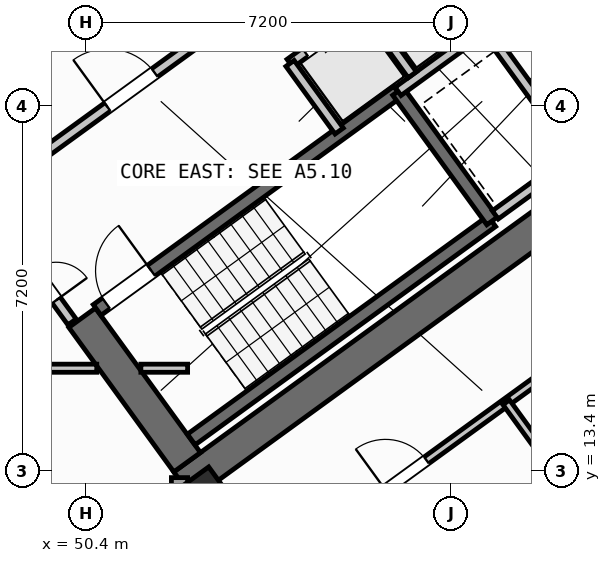
"""IFC4 building model, lengths in metres.
Left out: names, types, materials, properties, quantities, classifications, styles, units other than length and angle.
Written with IfcOpenShell. Run it as: python <this file> out.ifc"""

import sys

from ifc_helpers import new_model, si_unit, direction, frame, frame_2d, origin, origin_2d, place, context, subcontext, project, spatial, rectangle, hollow_rectangle, extrude, source, transform, mapped, element, fill, save


model = new_model("IFC4")
c1 = context("Model", 3, precision=1e-05, world=origin(), true_north=direction((0.0, 1.0)))
c2 = subcontext(c1, "Body", "Model", "MODEL_VIEW")
j1 = project(units=[si_unit("LENGTHUNIT", "METRE"), si_unit("PLANEANGLEUNIT", "RADIAN")], contexts=[c1])
p1 = place(None, origin())
s1 = spatial("IfcSite", under=j1, at=p1, CompositionType="ELEMENT")
p2 = place(p1, origin())
s2 = spatial("IfcBuilding", under=s1, at=p2, CompositionType="ELEMENT")
p3 = place(p2, frame((0.0, 0.0, 56.4)))
s3 = spatial("IfcBuildingStorey", under=s2, at=p3, CompositionType="ELEMENT", Elevation=56.4)
p4 = place(p3, frame((52.318, 13.11, 0.0), z_axis=(0.0, 0.0, 1.0), x_axis=(0.809019445368, 0.587781878776, 0.0)))
e1 = element("IfcWall", 1, at=p4, inside=s3, PredefinedType="SHEAR", context=c2, shape_type="SweptSolid", body=[
    extrude(rectangle(XDim=12.44, YDim=0.65, at=frame_2d((6.22, 0.0))), origin(), (0.0, 0.0, 1.0), 3.35),
])
p5 = place(p3, frame((52.39, 13.564, 0.0), z_axis=(0.0, 0.0, 1.0), x_axis=(-0.58779688989, 0.809008539037, 0.0)))
e2 = element("IfcWall", 2, at=p5, inside=s3, PredefinedType="SHEAR", context=c2, shape_type="SweptSolid", body=[
    extrude(rectangle(XDim=3.525, YDim=0.65, at=frame_2d((1.763, 0.0))), origin(), (0.0, 0.0, 1.0), 3.35),
])
m1 = source(origin(), c2, "Body", "SweptSolid", [
    extrude(hollow_rectangle(XDim=1.0, YDim=1.0, WallThickness=0.04, at=origin_2d()), origin(), (0.0, 0.0, 1.0), 3.6),
])
p6 = place(p3, frame((52.705, 12.773, 0.0), z_axis=(0.0, 0.0, 1.0), x_axis=(0.809016994375, 0.587785252292, 0.0)))
e3 = element("IfcColumn", 3, at=p6, inside=s3, PredefinedType="COLUMN", context=c2, shape_type="MappedRepresentation", body=[
    mapped(m1, transform((0.0, 0.0, 0.0), scale=1.0)),
])
p7 = place(p3, frame((58.455, 35.484, 0.0), z_axis=(0.0, 0.0, 1.0), x_axis=(0.587783625747, -0.809018176127, 0.0)))
e4 = element("IfcWall", 4, at=p7, inside=s3, PredefinedType="STANDARD", context=c2, shape_type="SweptSolid", body=[
    extrude(rectangle(XDim=21.587, YDim=0.32, at=frame_2d((10.794, 0.0))), origin(), (0.0, 0.0, 1.0), 2.725),
])
p8 = place(p7, frame((1.54, 0.0, 0.85)))
e5 = element("IfcOpeningElement", 5, at=p8, cuts=e4, PredefinedType="OPENING", context=c2, shape_type="SweptSolid", body=[
    extrude(rectangle(XDim=1.5, YDim=1.5, at=frame_2d((0.75, 0.75))), frame((0.0, 0.17, 0.0), z_axis=(0.0, -1.0, 0.0), x_axis=(1.0, 0.0, 0.0)), (0.0, 0.0, 1.0), 0.34),
])
p9 = place(p7, frame((4.695, 0.0, 0.85)))
e6 = element("IfcOpeningElement", 6, at=p9, cuts=e4, PredefinedType="OPENING", context=c2, shape_type="SweptSolid", body=[
    extrude(rectangle(XDim=1.8, YDim=1.5, at=frame_2d((0.9, 0.75))), frame((0.0, 0.17, 0.0), z_axis=(0.0, -1.0, 0.0), x_axis=(1.0, 0.0, 0.0)), (0.0, 0.0, 1.0), 0.34),
])
p10 = place(p7, frame((13.009, 0.0, 1.0)))
e7 = element("IfcOpeningElement", 7, at=p10, cuts=e4, PredefinedType="OPENING", context=c2, shape_type="SweptSolid", body=[
    extrude(rectangle(XDim=0.9, YDim=1.25, at=frame_2d((0.45, 0.625))), frame((0.0, 0.17, 0.0), z_axis=(0.0, -1.0, 0.0), x_axis=(1.0, 0.0, 0.0)), (0.0, 0.0, 1.0), 0.34),
])
p11 = place(p7, frame((16.092, 0.0, 0.95)))
e8 = element("IfcOpeningElement", 8, at=p11, cuts=e4, PredefinedType="OPENING", context=c2, shape_type="SweptSolid", body=[
    extrude(rectangle(XDim=1.2, YDim=1.4, at=frame_2d((0.6, 0.7))), frame((0.0, 0.17, 0.0), z_axis=(0.0, -1.0, 0.0), x_axis=(1.0, 0.0, 0.0)), (0.0, 0.0, 1.0), 0.34),
])
p12 = place(p7, frame((19.085, 0.0, 1.0)))
e9 = element("IfcOpeningElement", 9, at=p12, cuts=e4, PredefinedType="OPENING", context=c2, shape_type="SweptSolid", body=[
    extrude(rectangle(XDim=0.9, YDim=1.25, at=frame_2d((0.45, 0.625))), frame((0.0, 0.17, 0.0), z_axis=(0.0, -1.0, 0.0), x_axis=(1.0, 0.0, 0.0)), (0.0, 0.0, 1.0), 0.34),
])
p13 = place(p3, frame((71.098, 17.731, 0.0), z_axis=(0.0, 0.0, 1.0), x_axis=(-0.809021120468, -0.587779573171, 0.0)))
e10 = element("IfcWall", 10, at=p13, inside=s3, PredefinedType="STANDARD", context=c2, shape_type="SweptSolid", body=[
    extrude(rectangle(XDim=17.588, YDim=0.32, at=frame_2d((8.794, 0.0))), origin(), (0.0, 0.0, 1.0), 3.35),
])
p14 = place(p13, frame((1.624, 0.0, 0.0)))
e11 = element("IfcOpeningElement", 11, at=p14, cuts=e10, PredefinedType="OPENING", context=c2, shape_type="SweptSolid", body=[
    extrude(rectangle(XDim=1.05, YDim=2.15, at=frame_2d((0.525, 1.075))), frame((0.0, 0.17, 0.0), z_axis=(0.0, -1.0, 0.0), x_axis=(1.0, 0.0, 0.0)), (0.0, 0.0, 1.0), 0.34),
])
p15 = place(p13, frame((4.104, 0.0, 1.0)))
e12 = element("IfcOpeningElement", 12, at=p15, cuts=e10, PredefinedType="OPENING", context=c2, shape_type="SweptSolid", body=[
    extrude(rectangle(XDim=0.9, YDim=1.25, at=frame_2d((0.45, 0.625))), frame((0.0, 0.17, 0.0), z_axis=(0.0, -1.0, 0.0), x_axis=(1.0, 0.0, 0.0)), (0.0, 0.0, 1.0), 0.34),
])
p16 = place(p13, frame((7.879, 0.0, 0.85)))
e13 = element("IfcOpeningElement", 13, at=p16, cuts=e10, PredefinedType="OPENING", context=c2, shape_type="SweptSolid", body=[
    extrude(rectangle(XDim=1.8, YDim=1.5, at=frame_2d((0.9, 0.75))), frame((0.0, 0.17, 0.0), z_axis=(0.0, -1.0, 0.0), x_axis=(1.0, 0.0, 0.0)), (0.0, 0.0, 1.0), 0.34),
])
p17 = place(p13, frame((13.529, 0.0, 0.85)))
e14 = element("IfcOpeningElement", 14, at=p17, cuts=e10, PredefinedType="OPENING", context=c2, shape_type="SweptSolid", body=[
    extrude(rectangle(XDim=1.5, YDim=1.5, at=frame_2d((0.75, 0.75))), frame((0.0, 0.17, 0.0), z_axis=(0.0, -1.0, 0.0), x_axis=(1.0, 0.0, 0.0)), (0.0, 0.0, 1.0), 0.34),
])
p18 = place(p3, frame((52.24, 13.261, 0.0), z_axis=(0.0, 0.0, 1.0), x_axis=(0.0, -1.0, 0.0)))
e15 = element("IfcWall", 15, at=p18, inside=s3, PredefinedType="STANDARD", context=c2, shape_type="SweptSolid", body=[
    extrude(rectangle(XDim=9.795, YDim=0.32, at=frame_2d((4.897, 0.0))), origin(), (0.0, 0.0, 1.0), 3.35),
])
p19 = place(p18, frame((2.199, 0.0, 0.8)))
e16 = element("IfcOpeningElement", 16, at=p19, cuts=e15, PredefinedType="OPENING", context=c2, shape_type="SweptSolid", body=[
    extrude(rectangle(XDim=2.1, YDim=1.55, at=frame_2d((1.05, 0.775))), frame((0.0, 0.17, 0.0), z_axis=(0.0, -1.0, 0.0), x_axis=(1.0, 0.0, 0.0)), (0.0, 0.0, 1.0), 0.34),
])
p20 = place(p18, frame((6.88, 0.0, 0.85)))
e17 = element("IfcOpeningElement", 17, at=p20, cuts=e15, PredefinedType="OPENING", context=c2, shape_type="SweptSolid", body=[
    extrude(rectangle(XDim=1.8, YDim=1.5, at=frame_2d((0.9, 0.75))), frame((0.0, 0.17, 0.0), z_axis=(0.0, -1.0, 0.0), x_axis=(1.0, 0.0, 0.0)), (0.0, 0.0, 1.0), 0.34),
])
p21 = place(p3, frame((52.472, 14.013, 0.0), z_axis=(0.0, 0.0, 1.0), x_axis=(0.809028366311, 0.587769599847, 0.0)))
e18 = element("IfcWall", 18, at=p21, inside=s3, PredefinedType="SHEAR", context=c2, shape_type="SweptSolid", body=[
    extrude(rectangle(XDim=7.33, YDim=0.26, at=frame_2d((3.665, 0.0))), origin(), (0.0, 0.0, 1.0), 3.35),
])
p22 = place(p3, frame((50.615, 16.57, 0.0), z_axis=(0.0, 0.0, 1.0), x_axis=(0.809028366311, 0.587769599847, 0.0)))
e19 = element("IfcWall", 19, at=p22, inside=s3, PredefinedType="SHEAR", context=c2, shape_type="SweptSolid", body=[
    extrude(rectangle(XDim=7.33, YDim=0.26, at=frame_2d((3.665, 0.0))), origin(), (0.0, 0.0, 1.0), 3.35),
])
p23 = place(p22, frame((0.22, 0.0, 0.0)))
e20 = element("IfcOpeningElement", 20, at=p23, cuts=e19, PredefinedType="OPENING", context=c2, shape_type="SweptSolid", body=[
    extrude(rectangle(XDim=1.1, YDim=2.1, at=frame_2d((0.55, 1.05))), frame((0.0, 0.14, 0.0), z_axis=(0.0, -1.0, 0.0), x_axis=(1.0, 0.0, 0.0)), (0.0, 0.0, 1.0), 0.28),
])
p24 = place(p3, frame((58.41, 18.327, 0.0), z_axis=(0.0, 0.0, 1.0), x_axis=(-0.58776738483, 0.809029975545, 0.0)))
e21 = element("IfcWall", 21, at=p24, inside=s3, PredefinedType="SHEAR", context=c2, shape_type="SweptSolid", body=[
    extrude(rectangle(XDim=3.16, YDim=0.26, at=frame_2d((1.58, 0.0))), origin(), (0.0, 0.0, 1.0), 3.35),
])
p25 = place(p3, frame((47.106, 21.437, 0.0), z_axis=(0.0, 0.0, 1.0), x_axis=(0.809012514015, 0.58779141893, 0.0)))
e22 = element("IfcWall", 22, at=p25, inside=s3, PredefinedType="STANDARD", context=c2, shape_type="SweptSolid", body=[
    extrude(rectangle(XDim=3.398, YDim=0.2, at=frame_2d((1.699, 0.0))), origin(), (0.0, 0.0, 1.0), 3.34),
])
p26 = place(p25, frame((0.408, 0.0, 0.0)))
e23 = element("IfcOpeningElement", 23, at=p26, cuts=e22, PredefinedType="OPENING", context=c2, shape_type="SweptSolid", body=[
    extrude(rectangle(XDim=1.3, YDim=2.2, at=frame_2d((0.65, 1.1))), frame((0.0, 0.11, 0.0), z_axis=(0.0, -1.0, 0.0), x_axis=(1.0, 0.0, 0.0)), (0.0, 0.0, 1.0), 0.22),
])
p27 = place(p3, frame((48.799, 19.107, 0.0), z_axis=(0.0, 0.0, 1.0), x_axis=(0.809012959416, 0.587790805897, 0.0)))
e24 = element("IfcWall", 24, at=p27, inside=s3, PredefinedType="STANDARD", context=c2, shape_type="SweptSolid", body=[
    extrude(rectangle(XDim=5.718, YDim=0.2, at=frame_2d((2.859, 0.0))), origin(), (0.0, 0.0, 1.0), 3.34),
])
p28 = place(p27, frame((2.498, 0.0, 0.0)))
e25 = element("IfcOpeningElement", 25, at=p28, cuts=e24, PredefinedType="OPENING", context=c2, shape_type="SweptSolid", body=[
    extrude(rectangle(XDim=1.15, YDim=2.1, at=frame_2d((0.575, 1.05))), frame((0.0, 0.11, 0.0), z_axis=(0.0, -1.0, 0.0), x_axis=(1.0, 0.0, 0.0)), (0.0, 0.0, 1.0), 0.22),
])
p29 = place(p3, frame((56.553, 20.884, 0.0), z_axis=(0.0, 0.0, 1.0), x_axis=(0.809035789462, 0.587759382205, 0.0)))
e26 = element("IfcWall", 26, at=p29, inside=s3, PredefinedType="STANDARD", context=c2, shape_type="SweptSolid", body=[
    extrude(rectangle(XDim=3.768, YDim=0.2, at=frame_2d((1.884, 0.0))), origin(), (0.0, 0.0, 1.0), 3.34),
])
p30 = place(p29, frame((2.65, 0.0, 0.0)))
e27 = element("IfcOpeningElement", 27, at=p30, cuts=e26, PredefinedType="OPENING", context=c2, shape_type="SweptSolid", body=[
    extrude(rectangle(XDim=0.86, YDim=2.05, at=frame_2d((0.43, 1.025))), frame((0.0, 0.11, 0.0), z_axis=(0.0, -1.0, 0.0), x_axis=(1.0, 0.0, 0.0)), (0.0, 0.0, 1.0), 0.22),
])
p31 = place(p3, frame((54.421, 21.436, 0.0), z_axis=(0.0, 0.0, 1.0), x_axis=(0.809013710463, 0.587789772183, 0.0)))
e28 = element("IfcWall", 28, at=p31, inside=s3, PredefinedType="STANDARD", context=c2, shape_type="SweptSolid", body=[
    extrude(rectangle(XDim=5.36, YDim=0.2, at=frame_2d((2.68, 0.0))), origin(), (0.0, 0.0, 1.0), 3.34),
])
p32 = place(p31, frame((0.37, 0.0, 0.0)))
e29 = element("IfcOpeningElement", 29, at=p32, cuts=e28, PredefinedType="OPENING", context=c2, shape_type="SweptSolid", body=[
    extrude(rectangle(XDim=1.1, YDim=2.15, at=frame_2d((0.55, 1.075))), frame((0.0, 0.11, 0.0), z_axis=(0.0, -1.0, 0.0), x_axis=(1.0, 0.0, 0.0)), (0.0, 0.0, 1.0), 0.22),
])
p33 = place(p31, frame((2.17, 0.0, 0.0)))
e30 = element("IfcOpeningElement", 30, at=p33, cuts=e28, PredefinedType="OPENING", context=c2, shape_type="SweptSolid", body=[
    extrude(rectangle(XDim=1.1, YDim=2.15, at=frame_2d((0.55, 1.075))), frame((0.0, 0.11, 0.0), z_axis=(0.0, -1.0, 0.0), x_axis=(1.0, 0.0, 0.0)), (0.0, 0.0, 1.0), 0.22),
])
p34 = place(p31, frame((3.97, 0.0, 0.0)))
e31 = element("IfcOpeningElement", 31, at=p34, cuts=e28, PredefinedType="OPENING", context=c2, shape_type="SweptSolid", body=[
    extrude(rectangle(XDim=1.1, YDim=2.15, at=frame_2d((0.55, 1.075))), frame((0.0, 0.11, 0.0), z_axis=(0.0, -1.0, 0.0), x_axis=(1.0, 0.0, 0.0)), (0.0, 0.0, 1.0), 0.22),
])
p35 = place(p3, frame((55.391, 20.102, 0.0), z_axis=(0.0, 0.0, 1.0), x_axis=(-0.58778447739, 0.809017557374, 0.0)))
e32 = element("IfcWall", 32, at=p35, inside=s3, PredefinedType="STANDARD", context=c2, shape_type="SweptSolid", body=[
    extrude(rectangle(XDim=1.65, YDim=0.2, at=frame_2d((0.825, 0.0))), origin(), (0.0, 0.0, 1.0), 3.34),
])
p36 = place(p3, frame((56.834, 21.212, 0.0), z_axis=(0.0, 0.0, 1.0), x_axis=(-0.58776738483, 0.809029975545, 0.0)))
e33 = element("IfcWall", 33, at=p36, inside=s3, PredefinedType="STANDARD", context=c2, shape_type="SweptSolid", body=[
    extrude(rectangle(XDim=1.58, YDim=0.2, at=frame_2d((0.79, 0.0))), origin(), (0.0, 0.0, 1.0), 3.34),
])
p37 = place(p3, frame((60.067, 19.655, 0.0), z_axis=(0.0, 0.0, 1.0), x_axis=(-0.587800520745, 0.809005900975, 0.0)))
e34 = element("IfcWall", 34, at=p37, inside=s3, PredefinedType="STANDARD", context=c2, shape_type="SweptSolid", body=[
    extrude(rectangle(XDim=2.66, YDim=0.2, at=frame_2d((1.33, 0.0))), origin(), (0.0, 0.0, 1.0), 3.34),
])
p38 = place(p3, frame((58.472, 18.447, 0.0), z_axis=(0.0, 0.0, 1.0), x_axis=(0.809022487728, 0.587777691266, 0.0)))
e35 = element("IfcWall", 35, at=p38, inside=s3, PredefinedType="STANDARD", context=c2, shape_type="SweptSolid", body=[
    extrude(rectangle(XDim=3.648, YDim=0.2, at=frame_2d((1.824, 0.0))), origin(), (0.0, 0.0, 1.0), 3.34),
])
p39 = place(p3, frame((35.296, 15.42, 0.0), z_axis=(0.0, 0.0, 1.0), x_axis=(1.0, 0.0, 0.0)))
e36 = element("IfcWall", 36, at=p39, inside=s3, PredefinedType="PARTITIONING", context=c2, shape_type="SweptSolid", body=[
    extrude(rectangle(XDim=15.311, YDim=0.16, at=frame_2d((7.655, 0.0))), origin(), (0.0, 0.0, 1.0), 3.34),
])
p40 = place(p39, frame((0.91, 0.0, 0.0)))
e37 = element("IfcOpeningElement", 37, at=p40, cuts=e36, PredefinedType="OPENING", context=c2, shape_type="SweptSolid", body=[
    extrude(rectangle(XDim=1.0, YDim=2.1, at=frame_2d((0.5, 1.05))), frame((0.0, 0.09, 0.0), z_axis=(0.0, -1.0, 0.0), x_axis=(1.0, 0.0, 0.0)), (0.0, 0.0, 1.0), 0.18),
])
p41 = place(p39, frame((8.74, 0.0, 0.0)))
e38 = element("IfcOpeningElement", 38, at=p41, cuts=e36, PredefinedType="OPENING", context=c2, shape_type="SweptSolid", body=[
    extrude(rectangle(XDim=1.0, YDim=2.1, at=frame_2d((0.5, 1.05))), frame((0.0, 0.09, 0.0), z_axis=(0.0, -1.0, 0.0), x_axis=(1.0, 0.0, 0.0)), (0.0, 0.0, 1.0), 0.18),
])
p42 = place(p3, frame((51.477, 15.42, 0.0), z_axis=(0.0, 0.0, 1.0), x_axis=(1.0, 0.0, 0.0)))
e39 = element("IfcWall", 39, at=p42, inside=s3, PredefinedType="PARTITIONING", context=c2, shape_type="SweptSolid", body=[
    extrude(rectangle(XDim=0.923, YDim=0.16, at=frame_2d((0.461, 0.0))), origin(), (0.0, 0.0, 1.0), 3.34),
])
p43 = place(p3, frame((50.119, 16.333, 0.0), z_axis=(0.0, 0.0, 1.0), x_axis=(-0.587749856981, 0.809042709391, 0.0)))
e40 = element("IfcWall", 40, at=p43, inside=s3, PredefinedType="STANDARD", context=c2, shape_type="SweptSolid", body=[
    extrude(rectangle(XDim=2.96, YDim=0.2, at=frame_2d((1.48, 0.0))), origin(), (0.0, 0.0, 1.0), 3.34),
])
p44 = place(p43, frame((0.53, 0.0, 0.0)))
e41 = element("IfcOpeningElement", 41, at=p44, cuts=e40, PredefinedType="OPENING", context=c2, shape_type="SweptSolid", body=[
    extrude(rectangle(XDim=1.5, YDim=2.15, at=frame_2d((0.75, 1.075))), frame((0.0, 0.11, 0.0), z_axis=(0.0, -1.0, 0.0), x_axis=(1.0, 0.0, 0.0)), (0.0, 0.0, 1.0), 0.22),
])
p45 = place(p3, frame((53.705, 11.126, 0.0), z_axis=(0.0, 0.0, 1.0), x_axis=(0.809014504436, 0.587788679384, 0.0)))
e42 = element("IfcWall", 42, at=p45, inside=s3, PredefinedType="PARTITIONING", context=c2, shape_type="SweptSolid", body=[
    extrude(rectangle(XDim=14.67, YDim=0.16, at=frame_2d((7.335, 0.0))), origin(), (0.0, 0.0, 1.0), 3.34),
])
p46 = place(p45, frame((3.215, 0.0, 0.0)))
e43 = element("IfcOpeningElement", 43, at=p46, cuts=e42, PredefinedType="OPENING", context=c2, shape_type="SweptSolid", body=[
    extrude(rectangle(XDim=1.0, YDim=2.1, at=frame_2d((0.5, 1.05))), frame((0.0, 0.09, 0.0), z_axis=(0.0, -1.0, 0.0), x_axis=(1.0, 0.0, 0.0)), (0.0, 0.0, 1.0), 0.18),
])
p47 = place(p45, frame((9.915, 0.0, 0.0)))
e44 = element("IfcOpeningElement", 44, at=p47, cuts=e42, PredefinedType="OPENING", context=c2, shape_type="SweptSolid", body=[
    extrude(rectangle(XDim=1.0, YDim=2.1, at=frame_2d((0.5, 1.05))), frame((0.0, 0.09, 0.0), z_axis=(0.0, -1.0, 0.0), x_axis=(1.0, 0.0, 0.0)), (0.0, 0.0, 1.0), 0.18),
])
p48 = place(p3, frame((61.539, 10.823, 0.0), z_axis=(0.0, 0.0, 1.0), x_axis=(-0.587785532001, 0.809016791155, 0.0)))
e45 = element("IfcWall", 45, at=p48, inside=s3, PredefinedType="PARTITIONING", context=c2, shape_type="SweptSolid", body=[
    extrude(rectangle(XDim=4.85, YDim=0.16, at=frame_2d((2.425, 0.0))), origin(), (0.0, 0.0, 1.0), 3.34),
])
m2 = source(origin(), c2, "Body", "SweptSolid", [
    extrude(rectangle(XDim=1.1, YDim=2.1, at=frame_2d((0.55, 1.05))), frame((0.0, 0.025, 0.0), z_axis=(0.0, -1.0, 0.0), x_axis=(1.0, 0.0, 0.0)), (0.0, 0.0, 1.0), 0.05),
])
p49 = place(p23, origin())
e46 = element("IfcDoor", 46, at=p49, inside=s3, OperationType="SINGLE_SWING_RIGHT", PredefinedType="DOOR", context=c2, shape_type="MappedRepresentation", body=[
    mapped(m2, transform((0.0, 0.0, 0.0), scale=1.0)),
])
fill(e20, e46)
m3 = source(origin(), c2, "Body", "SweptSolid", [
    extrude(rectangle(XDim=1.15, YDim=2.1, at=frame_2d((0.575, 1.05))), frame((0.0, 0.025, 0.0), z_axis=(0.0, -1.0, 0.0), x_axis=(1.0, 0.0, 0.0)), (0.0, 0.0, 1.0), 0.05),
])
p50 = place(p28, origin())
e47 = element("IfcDoor", 47, at=p50, inside=s3, OperationType="SINGLE_SWING_LEFT", PredefinedType="DOOR", context=c2, shape_type="MappedRepresentation", body=[
    mapped(m3, transform((0.0, 0.0, 0.0), scale=1.0)),
])
fill(e25, e47)
m4 = source(origin(), c2, "Body", "SweptSolid", [
    extrude(rectangle(XDim=1.1, YDim=2.15, at=frame_2d((0.55, 1.075))), frame((0.0, 0.025, 0.0), z_axis=(0.0, -1.0, 0.0), x_axis=(1.0, 0.0, 0.0)), (0.0, 0.0, 1.0), 0.05),
])
p51 = place(p32, origin())
e48 = element("IfcDoor", 48, at=p51, inside=s3, OperationType="DOUBLE_DOOR_SLIDING", PredefinedType="DOOR", context=c2, shape_type="MappedRepresentation", body=[
    mapped(m4, transform((0.0, 0.0, 0.0), scale=1.0)),
])
fill(e29, e48)
m5 = source(origin(), c2, "Body", "SweptSolid", [
    extrude(rectangle(XDim=1.5, YDim=2.15, at=frame_2d((0.75, 1.075))), frame((0.0, 0.025, 0.0), z_axis=(0.0, -1.0, 0.0), x_axis=(1.0, 0.0, 0.0)), (0.0, 0.0, 1.0), 0.05),
])
p52 = place(p44, frame((1.5, 0.0, 0.0), z_axis=(0.0, 0.0, 1.0), x_axis=(-1.0, 0.0, 0.0)))
e49 = element("IfcDoor", 49, at=p52, inside=s3, OperationType="DOUBLE_DOOR_SINGLE_SWING", PredefinedType="DOOR", context=c2, shape_type="MappedRepresentation", body=[
    mapped(m5, transform((0.0, 0.0, 0.0), scale=1.0)),
])
fill(e41, e49)
m6 = source(origin(), c2, "Body", "SweptSolid", [
    extrude(rectangle(XDim=1.0, YDim=2.1, at=frame_2d((0.5, 1.05))), frame((0.0, 0.025, 0.0), z_axis=(0.0, -1.0, 0.0), x_axis=(1.0, 0.0, 0.0)), (0.0, 0.0, 1.0), 0.05),
])
p53 = place(p46, origin())
e50 = element("IfcDoor", 50, at=p53, inside=s3, OperationType="SINGLE_SWING_LEFT", PredefinedType="DOOR", context=c2, shape_type="MappedRepresentation", body=[
    mapped(m6, transform((0.0, 0.0, 0.0), scale=1.0)),
])
fill(e43, e50)
save(model, sys.argv[1])
